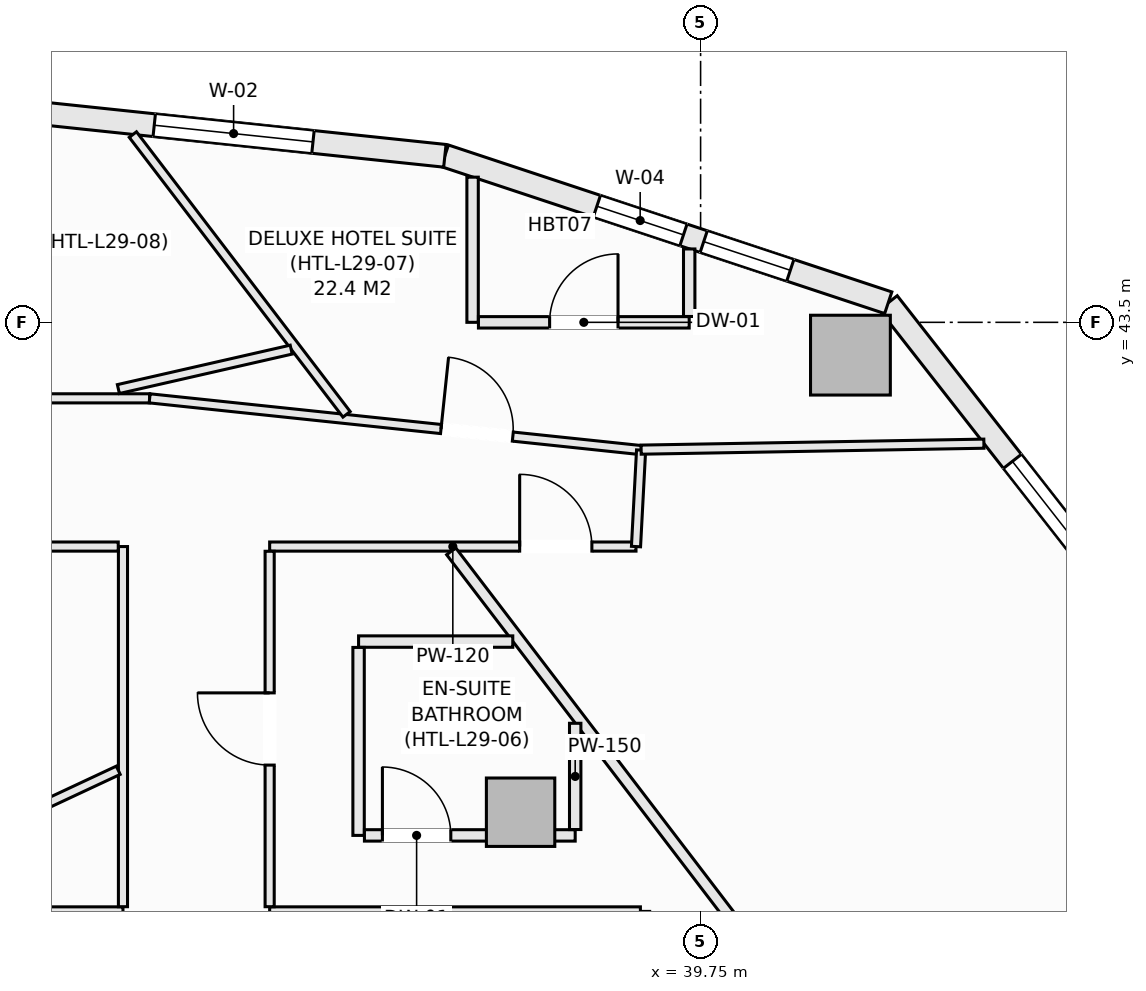
"""IFC4 building model, lengths in metres.
Left out: names, types, materials, properties, quantities, classifications, styles, units other than length and angle.
Written with IfcOpenShell. Run it as: python <this file> out.ifc"""

import sys

from ifc_helpers import new_model, si_unit, direction, frame, frame_2d, origin, origin_2d, place, context, subcontext, project, spatial, rectangle, extrude, element, fill, save


model = new_model("IFC4")
c1 = context("Model", 3, precision=1e-05, world=origin(), true_north=direction((0.0, 1.0)))
c2 = subcontext(c1, "Body", "Model", "MODEL_VIEW")
j1 = project(units=[si_unit("LENGTHUNIT", "METRE"), si_unit("PLANEANGLEUNIT", "RADIAN")], contexts=[c1])
p1 = place(None, origin())
s1 = spatial("IfcSite", under=j1, at=p1, CompositionType="ELEMENT")
p2 = place(p1, origin())
s2 = spatial("IfcBuilding", under=s1, at=p2, CompositionType="ELEMENT")
p3 = place(p2, frame((0.0, 0.0, 118.9)))
s3 = spatial("IfcBuildingStorey", under=s2, at=p3, CompositionType="ELEMENT", Elevation=118.9)
p4 = place(p3, frame((41.721, 43.068, -0.27), z_axis=(0.0, 0.0, 1.0), x_axis=(1.0, 0.0, 0.0)))
e1 = element("IfcColumn", 1, at=p4, inside=s3, PredefinedType="COLUMN", context=c2, shape_type="SweptSolid", body=[
    extrude(rectangle(XDim=1.05, YDim=1.05, at=origin_2d()), origin(), (0.0, 0.0, 1.0), 3.4),
])
p5 = place(p3, frame((37.382, 37.055, -0.27), z_axis=(0.0, 0.0, 1.0), x_axis=(1.0, 0.0, 0.0)))
e2 = element("IfcColumn", 2, at=p5, inside=s3, PredefinedType="COLUMN", context=c2, shape_type="SweptSolid", body=[
    extrude(rectangle(XDim=0.9, YDim=0.9, at=origin_2d()), origin(), (0.0, 0.0, 1.0), 3.4),
])
p6 = place(p3, frame((42.219, 43.758, 0.0), z_axis=(0.0, 0.0, 1.0), x_axis=(0.616435134162, -0.787405693001, 0.0)))
e3 = element("IfcWall", 3, at=p6, inside=s3, PredefinedType="SOLIDWALL", context=c2, shape_type="SweptSolid", body=[
    extrude(rectangle(XDim=5.759, YDim=0.3, at=frame_2d((2.879, 0.0))), origin(), (0.0, 0.0, 1.0), 2.653),
])
p7 = place(p6, frame((2.65, 0.0, 0.74)))
e4 = element("IfcOpeningElement", 4, at=p7, cuts=e3, PredefinedType="OPENING", context=c2, shape_type="SweptSolid", body=[
    extrude(rectangle(XDim=2.1, YDim=1.7, at=frame_2d((1.05, 0.85))), frame((0.0, 0.16, 0.0), z_axis=(0.0, -1.0, 0.0), x_axis=(1.0, 0.0, 0.0)), (0.0, 0.0, 1.0), 0.32),
])
p8 = place(p3, frame((36.385, 45.691, 0.0), z_axis=(0.0, 0.0, 1.0), x_axis=(0.949238009374, -0.314558741032, 0.0)))
e5 = element("IfcWall", 5, at=p8, inside=s3, PredefinedType="SOLIDWALL", context=c2, shape_type="SweptSolid", body=[
    extrude(rectangle(XDim=6.146, YDim=0.3, at=frame_2d((3.073, 0.0))), origin(), (0.0, 0.0, 1.0), 2.653),
])
p9 = place(p8, frame((2.107, 0.0, 0.74)))
e6 = element("IfcOpeningElement", 6, at=p9, cuts=e5, PredefinedType="OPENING", context=c2, shape_type="SweptSolid", body=[
    extrude(rectangle(XDim=1.2, YDim=1.7, at=frame_2d((0.6, 0.85))), frame((0.0, 0.16, 0.0), z_axis=(0.0, -1.0, 0.0), x_axis=(1.0, 0.0, 0.0)), (0.0, 0.0, 1.0), 0.32),
])
p10 = place(p8, frame((3.588, 0.0, 0.74)))
e7 = element("IfcOpeningElement", 7, at=p10, cuts=e5, PredefinedType="OPENING", context=c2, shape_type="SweptSolid", body=[
    extrude(rectangle(XDim=1.2, YDim=1.7, at=frame_2d((0.6, 0.85))), frame((0.0, 0.16, 0.0), z_axis=(0.0, -1.0, 0.0), x_axis=(1.0, 0.0, 0.0)), (0.0, 0.0, 1.0), 0.32),
])
p11 = place(p3, frame((30.125, 46.35, 0.0), z_axis=(0.0, 0.0, 1.0), x_axis=(0.994498012394, -0.104755445421, 0.0)))
e8 = element("IfcWall", 8, at=p11, inside=s3, PredefinedType="SOLIDWALL", context=c2, shape_type="SweptSolid", body=[
    extrude(rectangle(XDim=6.295, YDim=0.3, at=frame_2d((3.147, 0.0))), origin(), (0.0, 0.0, 1.0), 2.653),
])
p12 = place(p11, frame((2.45, 0.0, 0.74)))
e9 = element("IfcOpeningElement", 9, at=p12, cuts=e8, PredefinedType="OPENING", context=c2, shape_type="SweptSolid", body=[
    extrude(rectangle(XDim=2.1, YDim=1.7, at=frame_2d((1.05, 0.85))), frame((0.0, 0.16, 0.0), z_axis=(0.0, -1.0, 0.0), x_axis=(1.0, 0.0, 0.0)), (0.0, 0.0, 1.0), 0.32),
])
p13 = place(p3, frame((29.842, 35.75, 0.0), z_axis=(0.0, 0.0, 1.0), x_axis=(1.0, 0.0, 0.0)))
e10 = element("IfcWall", 10, at=p13, inside=s3, PredefinedType="PARTITIONING", context=c2, shape_type="SweptSolid", body=[
    extrude(rectangle(XDim=2.308, YDim=0.12, at=frame_2d((1.154, 0.0))), origin(), (0.0, 0.0, 1.0), 3.13),
])
p14 = place(p3, frame((34.08, 35.75, 0.0), z_axis=(0.0, 0.0, 1.0), x_axis=(1.0, 0.0, 0.0)))
e11 = element("IfcWall", 11, at=p14, inside=s3, PredefinedType="PARTITIONING", context=c2, shape_type="SweptSolid", body=[
    extrude(rectangle(XDim=4.878, YDim=0.12, at=frame_2d((2.439, 0.0))), origin(), (0.0, 0.0, 1.0), 2.505),
])
p15 = place(p3, frame((32.15, 35.812, 0.0), z_axis=(0.0, 0.0, 1.0), x_axis=(0.0, 1.0, 0.0)))
e12 = element("IfcWall", 12, at=p15, inside=s3, PredefinedType="PARTITIONING", context=c2, shape_type="SweptSolid", body=[
    extrude(rectangle(XDim=4.738, YDim=0.12, at=frame_2d((2.369, 0.0))), origin(), (0.0, 0.0, 1.0), 3.13),
])
p16 = place(p3, frame((21.351, 40.55, 0.0), z_axis=(0.0, 0.0, 1.0), x_axis=(1.0, 0.0, 0.0)))
e13 = element("IfcWall", 13, at=p16, inside=s3, PredefinedType="PARTITIONING", context=c2, shape_type="SweptSolid", body=[
    extrude(rectangle(XDim=10.737, YDim=0.12, at=frame_2d((5.369, 0.0))), origin(), (0.0, 0.0, 1.0), 3.13),
])
p17 = place(p16, frame((5.098, 0.0, 0.0)))
e14 = element("IfcOpeningElement", 14, at=p17, cuts=e13, PredefinedType="OPENING", context=c2, shape_type="SweptSolid", body=[
    extrude(rectangle(XDim=0.95, YDim=2.1, at=frame_2d((0.475, 1.05))), frame((0.0, 0.07, 0.0), z_axis=(0.0, -1.0, 0.0), x_axis=(1.0, 0.0, 0.0)), (0.0, 0.0, 1.0), 0.14),
])
p18 = place(p3, frame((34.08, 40.55, 0.0), z_axis=(0.0, 0.0, 1.0), x_axis=(1.0, 0.0, 0.0)))
e15 = element("IfcWall", 15, at=p18, inside=s3, PredefinedType="PARTITIONING", context=c2, shape_type="SweptSolid", body=[
    extrude(rectangle(XDim=4.82, YDim=0.12, at=frame_2d((2.41, 0.0))), origin(), (0.0, 0.0, 1.0), 3.13),
])
p19 = place(p18, frame((3.29, 0.0, 0.0)))
e16 = element("IfcOpeningElement", 16, at=p19, cuts=e15, PredefinedType="OPENING", context=c2, shape_type="SweptSolid", body=[
    extrude(rectangle(XDim=0.95, YDim=2.1, at=frame_2d((0.475, 1.05))), frame((0.0, 0.07, 0.0), z_axis=(0.0, -1.0, 0.0), x_axis=(1.0, 0.0, 0.0)), (0.0, 0.0, 1.0), 0.14),
])
p20 = place(p3, frame((27.749, 42.5, 0.0), z_axis=(0.0, 0.0, 1.0), x_axis=(1.0, 0.0, 0.0)))
e17 = element("IfcWall", 17, at=p20, inside=s3, PredefinedType="PARTITIONING", context=c2, shape_type="SweptSolid", body=[
    extrude(rectangle(XDim=4.752, YDim=0.12, at=frame_2d((2.376, 0.0))), origin(), (0.0, 0.0, 1.0), 3.13),
])
p21 = place(p3, frame((32.501, 42.5, 0.0), z_axis=(0.0, 0.0, 1.0), x_axis=(0.994501131299, -0.104725831799, 0.0)))
e18 = element("IfcWall", 18, at=p21, inside=s3, PredefinedType="PARTITIONING", context=c2, shape_type="SweptSolid", body=[
    extrude(rectangle(XDim=6.502, YDim=0.12, at=frame_2d((3.251, 0.0))), origin(), (0.0, 0.0, 1.0), 3.13),
])
p22 = place(p21, frame((3.855, 0.0, 0.0)))
e19 = element("IfcOpeningElement", 19, at=p22, cuts=e18, PredefinedType="OPENING", context=c2, shape_type="SweptSolid", body=[
    extrude(rectangle(XDim=0.95, YDim=2.1, at=frame_2d((0.475, 1.05))), frame((0.0, 0.07, 0.0), z_axis=(0.0, -1.0, 0.0), x_axis=(1.0, 0.0, 0.0)), (0.0, 0.0, 1.0), 0.14),
])
p23 = place(p3, frame((38.9, 40.55, 0.0), z_axis=(0.0, 0.0, 1.0), x_axis=(0.052851358225, 0.99860239031, 0.0)))
e20 = element("IfcWall", 20, at=p23, inside=s3, PredefinedType="PARTITIONING", context=c2, shape_type="SweptSolid", body=[
    extrude(rectangle(XDim=1.27, YDim=0.12, at=frame_2d((0.635, 0.0))), origin(), (0.0, 0.0, 1.0), 3.13),
])
p24 = place(p3, frame((34.08, 35.812, 0.0), z_axis=(0.0, 0.0, 1.0), x_axis=(0.0, 1.0, 0.0)))
e21 = element("IfcWall", 21, at=p24, inside=s3, PredefinedType="PARTITIONING", context=c2, shape_type="SweptSolid", body=[
    extrude(rectangle(XDim=4.676, YDim=0.12, at=frame_2d((2.338, 0.0))), origin(), (0.0, 0.0, 1.0), 2.812),
])
p25 = place(p24, frame((1.863, 0.0, 0.0)))
e22 = element("IfcOpeningElement", 22, at=p25, cuts=e21, PredefinedType="OPENING", context=c2, shape_type="SweptSolid", body=[
    extrude(rectangle(XDim=0.95, YDim=2.1, at=frame_2d((0.475, 1.05))), frame((0.0, 0.07, 0.0), z_axis=(0.0, -1.0, 0.0), x_axis=(1.0, 0.0, 0.0)), (0.0, 0.0, 1.0), 0.14),
])
p26 = place(p3, frame((29.842, 36.556, 0.0), z_axis=(0.0, 0.0, 1.0), x_axis=(0.905800400319, 0.423704655133, 0.0)))
e23 = element("IfcWall", 23, at=p26, inside=s3, PredefinedType="PARTITIONING", context=c2, shape_type="SweptSolid", body=[
    extrude(rectangle(XDim=2.479, YDim=0.12, at=frame_2d((1.24, 0.0))), origin(), (0.0, 0.0, 1.0), 3.13),
])
p27 = place(p3, frame((32.28, 45.97, 0.0), z_axis=(0.0, 0.0, 1.0), x_axis=(0.607060694389, -0.794655468318, 0.0)))
e24 = element("IfcWall", 24, at=p27, inside=s3, PredefinedType="PARTITIONING", context=c2, shape_type="SweptSolid", body=[
    extrude(rectangle(XDim=4.632, YDim=0.12, at=frame_2d((2.316, 0.0))), origin(), (0.0, 0.0, 1.0), 3.13),
])
p28 = place(p3, frame((36.468, 40.488, 0.0), z_axis=(0.0, 0.0, 1.0), x_axis=(0.607033615812, -0.794676153709, 0.0)))
e25 = element("IfcWall", 25, at=p28, inside=s3, PredefinedType="PARTITIONING", context=c2, shape_type="SweptSolid", body=[
    extrude(rectangle(XDim=12.078, YDim=0.15, at=frame_2d((6.039, 0.0))), origin(), (0.0, 0.0, 1.0), 3.13),
])
p29 = place(p3, frame((38.968, 41.825, 0.0), z_axis=(0.0, 0.0, 1.0), x_axis=(0.999848100989, 0.017429140782, 0.0)))
e26 = element("IfcWall", 26, at=p29, inside=s3, PredefinedType="PARTITIONING", context=c2, shape_type="SweptSolid", body=[
    extrude(rectangle(XDim=4.51, YDim=0.12, at=frame_2d((2.255, 0.0))), origin(), (0.0, 0.0, 1.0), 3.13),
])
p30 = place(p3, frame((35.25, 39.3, 0.0), z_axis=(0.0, 0.0, 1.0), x_axis=(1.0, 0.0, 0.0)))
e27 = element("IfcWall", 27, at=p30, inside=s3, PredefinedType="PARTITIONING", context=c2, shape_type="SweptSolid", body=[
    extrude(rectangle(XDim=2.029, YDim=0.15, at=frame_2d((1.014, 0.0))), origin(), (0.0, 0.0, 1.0), 3.13),
])
p31 = place(p3, frame((35.25, 36.75, 0.0), z_axis=(0.0, 0.0, 1.0), x_axis=(0.0, 1.0, 0.0)))
e28 = element("IfcWall", 28, at=p31, inside=s3, PredefinedType="PARTITIONING", context=c2, shape_type="SweptSolid", body=[
    extrude(rectangle(XDim=2.473, YDim=0.15, at=frame_2d((1.236, 0.0))), origin(), (0.0, 0.0, 1.0), 3.13),
])
p32 = place(p3, frame((35.327, 36.75, 0.0), z_axis=(0.0, 0.0, 1.0), x_axis=(1.0, 0.0, 0.0)))
e29 = element("IfcWall", 29, at=p32, inside=s3, PredefinedType="PARTITIONING", context=c2, shape_type="SweptSolid", body=[
    extrude(rectangle(XDim=2.773, YDim=0.15, at=frame_2d((1.387, 0.0))), origin(), (0.0, 0.0, 1.0), 2.505),
])
p33 = place(p32, frame((0.237, 0.0, 0.0)))
e30 = element("IfcOpeningElement", 30, at=p33, cuts=e29, PredefinedType="OPENING", context=c2, shape_type="SweptSolid", body=[
    extrude(rectangle(XDim=0.9, YDim=2.1, at=frame_2d((0.45, 1.05))), frame((0.0, 0.085, 0.0), z_axis=(0.0, -1.0, 0.0), x_axis=(1.0, 0.0, 0.0)), (0.0, 0.0, 1.0), 0.17),
])
p34 = place(p3, frame((38.1, 36.827, 0.0), z_axis=(0.0, 0.0, 1.0), x_axis=(0.0, 1.0, 0.0)))
e31 = element("IfcWall", 31, at=p34, inside=s3, PredefinedType="PARTITIONING", context=c2, shape_type="SweptSolid", body=[
    extrude(rectangle(XDim=1.398, YDim=0.15, at=frame_2d((0.699, 0.0))), origin(), (0.0, 0.0, 1.0), 2.505),
])
p35 = place(p3, frame((36.75, 43.5, 0.0), z_axis=(0.0, 0.0, 1.0), x_axis=(0.0, 1.0, 0.0)))
e32 = element("IfcWall", 32, at=p35, inside=s3, PredefinedType="PARTITIONING", context=c2, shape_type="SweptSolid", body=[
    extrude(rectangle(XDim=1.91, YDim=0.15, at=frame_2d((0.955, 0.0))), origin(), (0.0, 0.0, 1.0), 3.13),
])
p36 = place(p3, frame((36.827, 43.5, 0.0), z_axis=(0.0, 0.0, 1.0), x_axis=(1.0, 0.0, 0.0)))
e33 = element("IfcWall", 33, at=p36, inside=s3, PredefinedType="PARTITIONING", context=c2, shape_type="SweptSolid", body=[
    extrude(rectangle(XDim=2.773, YDim=0.15, at=frame_2d((1.387, 0.0))), origin(), (0.0, 0.0, 1.0), 2.653),
])
p37 = place(p36, frame((0.937, 0.0, 0.0)))
e34 = element("IfcOpeningElement", 34, at=p37, cuts=e33, PredefinedType="OPENING", context=c2, shape_type="SweptSolid", body=[
    extrude(rectangle(XDim=0.9, YDim=2.1, at=frame_2d((0.45, 1.05))), frame((0.0, 0.085, 0.0), z_axis=(0.0, -1.0, 0.0), x_axis=(1.0, 0.0, 0.0)), (0.0, 0.0, 1.0), 0.17),
])
p38 = place(p3, frame((39.6, 43.577, 0.0), z_axis=(0.0, 0.0, 1.0), x_axis=(0.0, 1.0, 0.0)))
e35 = element("IfcWall", 35, at=p38, inside=s3, PredefinedType="PARTITIONING", context=c2, shape_type="SweptSolid", body=[
    extrude(rectangle(XDim=0.888, YDim=0.15, at=frame_2d((0.444, 0.0))), origin(), (0.0, 0.0, 1.0), 3.13),
])
p39 = place(p3, frame((32.09, 42.622, 0.0), z_axis=(0.0, 0.0, 1.0), x_axis=(0.974947431387, 0.222435397434, 0.0)))
e36 = element("IfcWall", 36, at=p39, inside=s3, PredefinedType="PARTITIONING", context=c2, shape_type="SweptSolid", body=[
    extrude(rectangle(XDim=2.332, YDim=0.12, at=frame_2d((1.166, 0.0))), origin(), (0.0, 0.0, 1.0), 3.13),
])
p40 = place(p7, origin())
e37 = element("IfcWindow", 37, at=p40, inside=s3, PartitioningType="SINGLE_PANEL", PredefinedType="WINDOW", context=c2, shape_type="SweptSolid", body=[
    extrude(rectangle(XDim=2.1, YDim=1.7, at=frame_2d((1.05, 0.85))), frame((0.0, 0.03, 0.0), z_axis=(0.0, -1.0, 0.0), x_axis=(1.0, 0.0, 0.0)), (0.0, 0.0, 1.0), 0.06),
])
fill(e4, e37)
p41 = place(p9, origin())
e38 = element("IfcWindow", 38, at=p41, inside=s3, PartitioningType="SINGLE_PANEL", PredefinedType="WINDOW", context=c2, shape_type="SweptSolid", body=[
    extrude(rectangle(XDim=1.2, YDim=1.7, at=frame_2d((0.6, 0.85))), frame((0.0, 0.03, 0.0), z_axis=(0.0, -1.0, 0.0), x_axis=(1.0, 0.0, 0.0)), (0.0, 0.0, 1.0), 0.06),
])
fill(e6, e38)
p42 = place(p12, origin())
e39 = element("IfcWindow", 39, at=p42, inside=s3, PartitioningType="SINGLE_PANEL", PredefinedType="WINDOW", context=c2, shape_type="SweptSolid", body=[
    extrude(rectangle(XDim=2.1, YDim=1.7, at=frame_2d((1.05, 0.85))), frame((0.0, 0.03, 0.0), z_axis=(0.0, -1.0, 0.0), x_axis=(1.0, 0.0, 0.0)), (0.0, 0.0, 1.0), 0.06),
])
fill(e9, e39)
p43 = place(p19, origin())
e40 = element("IfcDoor", 40, at=p43, inside=s3, OperationType="SINGLE_SWING_LEFT", PredefinedType="DOOR", context=c2, shape_type="SweptSolid", body=[
    extrude(rectangle(XDim=0.95, YDim=2.1, at=frame_2d((0.475, 1.05))), frame((0.0, 0.025, 0.0), z_axis=(0.0, -1.0, 0.0), x_axis=(1.0, 0.0, 0.0)), (0.0, 0.0, 1.0), 0.05),
])
fill(e16, e40)
p44 = place(p25, origin())
e41 = element("IfcDoor", 41, at=p44, inside=s3, OperationType="SINGLE_SWING_RIGHT", PredefinedType="DOOR", context=c2, shape_type="SweptSolid", body=[
    extrude(rectangle(XDim=0.95, YDim=2.1, at=frame_2d((0.475, 1.05))), frame((0.0, 0.025, 0.0), z_axis=(0.0, -1.0, 0.0), x_axis=(1.0, 0.0, 0.0)), (0.0, 0.0, 1.0), 0.05),
])
fill(e22, e41)
p45 = place(p22, origin())
e42 = element("IfcDoor", 42, at=p45, inside=s3, OperationType="SINGLE_SWING_LEFT", PredefinedType="DOOR", context=c2, shape_type="SweptSolid", body=[
    extrude(rectangle(XDim=0.95, YDim=2.1, at=frame_2d((0.475, 1.05))), frame((0.0, 0.025, 0.0), z_axis=(0.0, -1.0, 0.0), x_axis=(1.0, 0.0, 0.0)), (0.0, 0.0, 1.0), 0.05),
])
fill(e19, e42)
p46 = place(p33, origin())
e43 = element("IfcDoor", 43, at=p46, inside=s3, OperationType="SINGLE_SWING_LEFT", PredefinedType="DOOR", context=c2, shape_type="SweptSolid", body=[
    extrude(rectangle(XDim=0.9, YDim=2.1, at=frame_2d((0.45, 1.05))), frame((0.0, 0.025, 0.0), z_axis=(0.0, -1.0, 0.0), x_axis=(1.0, 0.0, 0.0)), (0.0, 0.0, 1.0), 0.05),
])
fill(e30, e43)
p47 = place(p37, origin())
e44 = element("IfcDoor", 44, at=p47, inside=s3, OperationType="SINGLE_SWING_RIGHT", PredefinedType="DOOR", context=c2, shape_type="SweptSolid", body=[
    extrude(rectangle(XDim=0.9, YDim=2.1, at=frame_2d((0.45, 1.05))), frame((0.0, 0.025, 0.0), z_axis=(0.0, -1.0, 0.0), x_axis=(1.0, 0.0, 0.0)), (0.0, 0.0, 1.0), 0.05),
])
fill(e34, e44)
p48 = place(p10, origin())
e45 = element("IfcWindow", 45, at=p48, inside=s3, PartitioningType="SINGLE_PANEL", PredefinedType="WINDOW", context=c2, shape_type="SweptSolid", body=[
    extrude(rectangle(XDim=1.2, YDim=1.7, at=frame_2d((0.6, 0.85))), frame((0.0, 0.03, 0.0), z_axis=(0.0, -1.0, 0.0), x_axis=(1.0, 0.0, 0.0)), (0.0, 0.0, 1.0), 0.06),
])
fill(e7, e45)
save(model, sys.argv[1])
